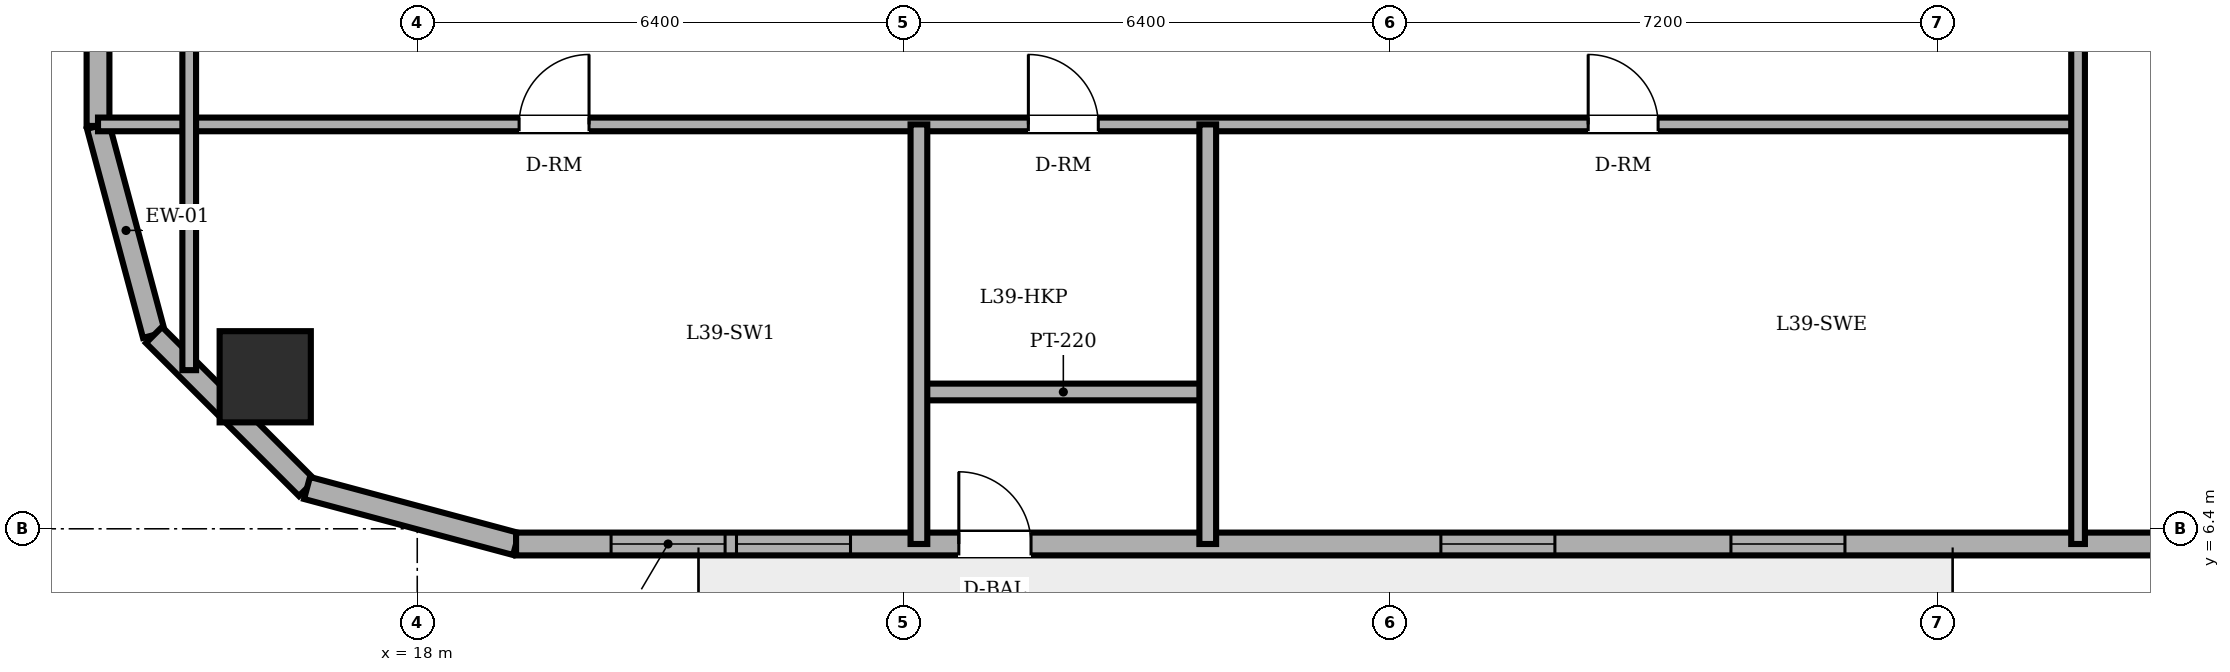
"""IFC4 building model, lengths in metres.
Left out: names, types, materials, properties, quantities, classifications, styles, units other than length and angle.
Written with IfcOpenShell. Run it as: python <this file> out.ifc"""

import sys

from ifc_helpers import new_model, si_unit, direction, frame, frame_2d, origin, origin_2d, place, context, subcontext, project, spatial, rectangle, circle, extrude, element, fill, save


model = new_model("IFC4")
c1 = context("Model", 3, precision=1e-05, world=origin(), true_north=direction((0.0, 1.0)))
c2 = subcontext(c1, "Body", "Model", "MODEL_VIEW")
j1 = project(units=[si_unit("LENGTHUNIT", "METRE"), si_unit("PLANEANGLEUNIT", "RADIAN")], contexts=[c1])
p1 = place(None, origin())
s1 = spatial("IfcSite", under=j1, at=p1, CompositionType="ELEMENT")
p2 = place(p1, origin())
s2 = spatial("IfcBuilding", under=s1, at=p2, CompositionType="ELEMENT")
p3 = place(p2, frame((0.0, 0.0, 151.0)))
s3 = spatial("IfcBuildingStorey", under=s2, at=p3, CompositionType="ELEMENT", Elevation=151.0)
p4 = place(p3, frame((16.0, 8.4, 0.0), z_axis=(0.0, 0.0, 1.0), x_axis=(1.0, 0.0, 0.0)))
e1 = element("IfcColumn", 1, at=p4, inside=s3, PredefinedType="COLUMN", context=c2, shape_type="SweptSolid", body=[
    extrude(circle(Radius=0.6, at=origin_2d()), origin(), (0.0, 0.0, 1.0), 3.6),
])
p5 = place(p3, frame((13.8, 11.7, 0.0), z_axis=(0.0, 0.0, 1.0), x_axis=(0.258884674387, -0.965908238586, 0.0)))
e2 = element("IfcWall", 2, at=p5, inside=s3, PredefinedType="SOLIDWALL", context=c2, shape_type="SweptSolid", body=[
    extrude(rectangle(XDim=2.847, YDim=0.3, at=frame_2d((1.424, 0.0))), origin(), (0.0, 0.0, 1.0), 3.4),
])
p6 = place(p3, frame((14.537, 8.95, 0.0), z_axis=(0.0, 0.0, 1.0), x_axis=(0.707106781187, -0.707106781187, 0.0)))
e3 = element("IfcWall", 3, at=p6, inside=s3, PredefinedType="SOLIDWALL", context=c2, shape_type="SweptSolid", body=[
    extrude(rectangle(XDim=2.847, YDim=0.3, at=frame_2d((1.423, 0.0))), origin(), (0.0, 0.0, 1.0), 3.4),
])
p7 = place(p3, frame((16.55, 6.937, 0.0), z_axis=(0.0, 0.0, 1.0), x_axis=(0.965908238586, -0.258884674387, 0.0)))
e4 = element("IfcWall", 4, at=p7, inside=s3, PredefinedType="SOLIDWALL", context=c2, shape_type="SweptSolid", body=[
    extrude(rectangle(XDim=2.847, YDim=0.3, at=frame_2d((1.424, 0.0))), origin(), (0.0, 0.0, 1.0), 3.4),
])
p8 = place(p3, frame((19.3, 6.2, 0.0), z_axis=(0.0, 0.0, 1.0), x_axis=(1.0, 0.0, 0.0)))
e5 = element("IfcWall", 5, at=p8, inside=s3, PredefinedType="SOLIDWALL", context=c2, shape_type="SweptSolid", body=[
    extrude(rectangle(XDim=30.282, YDim=0.3, at=frame_2d((15.141, 0.0))), origin(), (0.0, 0.0, 1.0), 3.4),
])
p9 = place(p8, frame((5.825, 0.0, 0.0)))
e6 = element("IfcOpeningElement", 6, at=p9, cuts=e5, PredefinedType="OPENING", context=c2, shape_type="SweptSolid", body=[
    extrude(rectangle(XDim=0.95, YDim=2.2, at=frame_2d((0.475, 1.1))), frame((0.0, 0.16, 0.0), z_axis=(0.0, -1.0, 0.0), x_axis=(1.0, 0.0, 0.0)), (0.0, 0.0, 1.0), 0.32),
])
p10 = place(p8, frame((1.25, 0.0, 0.85)))
e7 = element("IfcOpeningElement", 7, at=p10, cuts=e5, PredefinedType="OPENING", context=c2, shape_type="SweptSolid", body=[
    extrude(rectangle(XDim=1.5, YDim=1.55, at=frame_2d((0.75, 0.775))), frame((0.0, 0.16, 0.0), z_axis=(0.0, -1.0, 0.0), x_axis=(1.0, 0.0, 0.0)), (0.0, 0.0, 1.0), 0.32),
])
p11 = place(p8, frame((2.9, 0.0, 0.85)))
e8 = element("IfcOpeningElement", 8, at=p11, cuts=e5, PredefinedType="OPENING", context=c2, shape_type="SweptSolid", body=[
    extrude(rectangle(XDim=1.5, YDim=1.55, at=frame_2d((0.75, 0.775))), frame((0.0, 0.16, 0.0), z_axis=(0.0, -1.0, 0.0), x_axis=(1.0, 0.0, 0.0)), (0.0, 0.0, 1.0), 0.32),
])
p12 = place(p8, frame((12.167, 0.0, 0.85)))
e9 = element("IfcOpeningElement", 9, at=p12, cuts=e5, PredefinedType="OPENING", context=c2, shape_type="SweptSolid", body=[
    extrude(rectangle(XDim=1.5, YDim=1.55, at=frame_2d((0.75, 0.775))), frame((0.0, 0.16, 0.0), z_axis=(0.0, -1.0, 0.0), x_axis=(1.0, 0.0, 0.0)), (0.0, 0.0, 1.0), 0.32),
])
p13 = place(p8, frame((15.983, 0.0, 0.85)))
e10 = element("IfcOpeningElement", 10, at=p13, cuts=e5, PredefinedType="OPENING", context=c2, shape_type="SweptSolid", body=[
    extrude(rectangle(XDim=1.5, YDim=1.55, at=frame_2d((0.75, 0.775))), frame((0.0, 0.16, 0.0), z_axis=(0.0, -1.0, 0.0), x_axis=(1.0, 0.0, 0.0)), (0.0, 0.0, 1.0), 0.32),
])
p14 = place(p8, frame((22.484, 0.0, 0.85)))
e11 = element("IfcOpeningElement", 11, at=p14, cuts=e5, PredefinedType="OPENING", context=c2, shape_type="SweptSolid", body=[
    extrude(rectangle(XDim=1.5, YDim=1.55, at=frame_2d((0.75, 0.775))), frame((0.0, 0.16, 0.0), z_axis=(0.0, -1.0, 0.0), x_axis=(1.0, 0.0, 0.0)), (0.0, 0.0, 1.0), 0.32),
])
p15 = place(p8, frame((25.168, 0.0, 0.85)))
e12 = element("IfcOpeningElement", 12, at=p15, cuts=e5, PredefinedType="OPENING", context=c2, shape_type="SweptSolid", body=[
    extrude(rectangle(XDim=1.5, YDim=1.55, at=frame_2d((0.75, 0.775))), frame((0.0, 0.16, 0.0), z_axis=(0.0, -1.0, 0.0), x_axis=(1.0, 0.0, 0.0)), (0.0, 0.0, 1.0), 0.32),
])
p16 = place(p8, frame((28.773, 0.0, 0.85)))
e13 = element("IfcOpeningElement", 13, at=p16, cuts=e5, PredefinedType="OPENING", context=c2, shape_type="SweptSolid", body=[
    extrude(rectangle(XDim=1.05, YDim=1.55, at=frame_2d((0.525, 0.775))), frame((0.0, 0.16, 0.0), z_axis=(0.0, -1.0, 0.0), x_axis=(1.0, 0.0, 0.0)), (0.0, 0.0, 1.0), 0.32),
])
p17 = place(p3, frame((13.8, 36.3, 0.0), z_axis=(0.0, 0.0, 1.0), x_axis=(0.0, -1.0, 0.0)))
e14 = element("IfcWall", 14, at=p17, inside=s3, PredefinedType="SOLIDWALL", context=c2, shape_type="SweptSolid", body=[
    extrude(rectangle(XDim=24.6, YDim=0.3, at=frame_2d((12.3, 0.0))), origin(), (0.0, 0.0, 1.0), 3.4),
])
p18 = place(p17, frame((5.003, 0.0, 0.85)))
e15 = element("IfcOpeningElement", 15, at=p18, cuts=e14, PredefinedType="OPENING", context=c2, shape_type="SweptSolid", body=[
    extrude(rectangle(XDim=1.5, YDim=1.55, at=frame_2d((0.75, 0.775))), frame((0.0, 0.16, 0.0), z_axis=(0.0, -1.0, 0.0), x_axis=(1.0, 0.0, 0.0)), (0.0, 0.0, 1.0), 0.32),
])
p19 = place(p17, frame((8.277, 0.0, 0.85)))
e16 = element("IfcOpeningElement", 16, at=p19, cuts=e14, PredefinedType="OPENING", context=c2, shape_type="SweptSolid", body=[
    extrude(rectangle(XDim=1.5, YDim=1.55, at=frame_2d((0.75, 0.775))), frame((0.0, 0.16, 0.0), z_axis=(0.0, -1.0, 0.0), x_axis=(1.0, 0.0, 0.0)), (0.0, 0.0, 1.0), 0.32),
])
p20 = place(p17, frame((14.823, 0.0, 0.85)))
e17 = element("IfcOpeningElement", 17, at=p20, cuts=e14, PredefinedType="OPENING", context=c2, shape_type="SweptSolid", body=[
    extrude(rectangle(XDim=1.5, YDim=1.55, at=frame_2d((0.75, 0.775))), frame((0.0, 0.16, 0.0), z_axis=(0.0, -1.0, 0.0), x_axis=(1.0, 0.0, 0.0)), (0.0, 0.0, 1.0), 0.32),
])
p21 = place(p17, frame((18.097, 0.0, 0.85)))
e18 = element("IfcOpeningElement", 18, at=p21, cuts=e14, PredefinedType="OPENING", context=c2, shape_type="SweptSolid", body=[
    extrude(rectangle(XDim=1.5, YDim=1.55, at=frame_2d((0.75, 0.775))), frame((0.0, 0.16, 0.0), z_axis=(0.0, -1.0, 0.0), x_axis=(1.0, 0.0, 0.0)), (0.0, 0.0, 1.0), 0.32),
])
p22 = place(p3, frame((24.6, 8.2, 0.0), z_axis=(0.0, 0.0, 1.0), x_axis=(1.0, 0.0, 0.0)))
e19 = element("IfcWall", 19, at=p22, inside=s3, PredefinedType="PARTITIONING", context=c2, shape_type="SweptSolid", body=[
    extrude(rectangle(XDim=3.8, YDim=0.22, at=frame_2d((1.9, 0.0))), origin(), (0.0, 0.0, 1.0), 2.882),
])
p23 = place(p3, frame((13.8, 11.72, 0.0), z_axis=(0.0, 0.0, 1.0), x_axis=(1.0, 0.0, 0.0)))
e20 = element("IfcWall", 20, at=p23, inside=s3, PredefinedType="PARTITIONING", context=c2, shape_type="SweptSolid", body=[
    extrude(rectangle(XDim=26.05, YDim=0.18, at=frame_2d((13.025, 0.0))), origin(), (0.0, 0.0, 1.0), 3.4),
])
p24 = place(p23, frame((12.24, 0.0, 0.0)))
e21 = element("IfcOpeningElement", 21, at=p24, cuts=e20, PredefinedType="OPENING", context=c2, shape_type="SweptSolid", body=[
    extrude(rectangle(XDim=0.92, YDim=2.1, at=frame_2d((0.46, 1.05))), frame((0.0, 0.1, 0.0), z_axis=(0.0, -1.0, 0.0), x_axis=(1.0, 0.0, 0.0)), (0.0, 0.0, 1.0), 0.2),
])
p25 = place(p23, frame((5.54, 0.0, 0.0)))
e22 = element("IfcOpeningElement", 22, at=p25, cuts=e20, PredefinedType="OPENING", context=c2, shape_type="SweptSolid", body=[
    extrude(rectangle(XDim=0.92, YDim=2.1, at=frame_2d((0.46, 1.05))), frame((0.0, 0.1, 0.0), z_axis=(0.0, -1.0, 0.0), x_axis=(1.0, 0.0, 0.0)), (0.0, 0.0, 1.0), 0.2),
])
p26 = place(p23, frame((19.605, 0.0, 0.0)))
e23 = element("IfcOpeningElement", 23, at=p26, cuts=e20, PredefinedType="OPENING", context=c2, shape_type="SweptSolid", body=[
    extrude(rectangle(XDim=0.92, YDim=2.1, at=frame_2d((0.46, 1.05))), frame((0.0, 0.1, 0.0), z_axis=(0.0, -1.0, 0.0), x_axis=(1.0, 0.0, 0.0)), (0.0, 0.0, 1.0), 0.2),
])
p27 = place(p3, frame((15.0, 8.487, 0.0), z_axis=(0.0, 0.0, 1.0), x_axis=(0.0, 1.0, 0.0)))
e24 = element("IfcWall", 24, at=p27, inside=s3, PredefinedType="PARTITIONING", context=c2, shape_type="SweptSolid", body=[
    extrude(rectangle(XDim=5.693, YDim=0.18, at=frame_2d((2.846, 0.0))), origin(), (0.0, 0.0, 1.0), 3.4),
])
for number, where, z_axis, x_axis in (
    (25, (24.6, 6.2, 0.0), (0.0, 0.0, 1.0), (0.0, 1.0, 0.0)),
    (26, (28.4, 6.2, 0.0), (0.0, 0.0, 1.0), (0.0, 1.0, 0.0)),
):
    element("IfcWall", number, at=place(p3, frame(where, z_axis=z_axis, x_axis=x_axis)), inside=s3, PredefinedType="PARTITIONING", context=c2, shape_type="SweptSolid", body=[
        extrude(rectangle(XDim=5.52, YDim=0.22, at=frame_2d((2.76, 0.0))), origin(), (0.0, 0.0, 1.0), 3.4),
    ])
p28 = place(p3, frame((39.85, 6.2, 0.0), z_axis=(0.0, 0.0, 1.0), x_axis=(0.0, 1.0, 0.0)))
e27 = element("IfcWall", 27, at=p28, inside=s3, PredefinedType="PARTITIONING", context=c2, shape_type="SweptSolid", body=[
    extrude(rectangle(XDim=16.62, YDim=0.18, at=frame_2d((8.31, 0.0))), origin(), (0.0, 0.0, 1.0), 3.4),
])
p29 = place(p28, frame((10.31, 0.0, 0.0)))
e28 = element("IfcOpeningElement", 28, at=p29, cuts=e27, PredefinedType="OPENING", context=c2, shape_type="SweptSolid", body=[
    extrude(rectangle(XDim=1.0, YDim=2.15, at=frame_2d((0.5, 1.075))), frame((0.0, 0.1, 0.0), z_axis=(0.0, -1.0, 0.0), x_axis=(1.0, 0.0, 0.0)), (0.0, 0.0, 1.0), 0.2),
])
p30 = place(p9, origin())
e29 = element("IfcDoor", 29, at=p30, inside=s3, OperationType="SINGLE_SWING_LEFT", PredefinedType="DOOR", context=c2, shape_type="SweptSolid", body=[
    extrude(rectangle(XDim=0.95, YDim=2.2, at=frame_2d((0.475, 1.1))), frame((0.0, 0.025, 0.0), z_axis=(0.0, -1.0, 0.0), x_axis=(1.0, 0.0, 0.0)), (0.0, 0.0, 1.0), 0.05),
])
fill(e6, e29)
p31 = place(p10, origin())
e30 = element("IfcWindow", 30, at=p31, inside=s3, PartitioningType="DOUBLE_PANEL_VERTICAL", PredefinedType="WINDOW", context=c2, shape_type="SweptSolid", body=[
    extrude(rectangle(XDim=1.5, YDim=1.55, at=frame_2d((0.75, 0.775))), frame((0.0, 0.03, 0.0), z_axis=(0.0, -1.0, 0.0), x_axis=(1.0, 0.0, 0.0)), (0.0, 0.0, 1.0), 0.06),
])
fill(e7, e30)
p32 = place(p11, origin())
e31 = element("IfcWindow", 31, at=p32, inside=s3, PartitioningType="DOUBLE_PANEL_VERTICAL", PredefinedType="WINDOW", context=c2, shape_type="SweptSolid", body=[
    extrude(rectangle(XDim=1.5, YDim=1.55, at=frame_2d((0.75, 0.775))), frame((0.0, 0.03, 0.0), z_axis=(0.0, -1.0, 0.0), x_axis=(1.0, 0.0, 0.0)), (0.0, 0.0, 1.0), 0.06),
])
fill(e8, e31)
p33 = place(p12, origin())
e32 = element("IfcWindow", 32, at=p33, inside=s3, PartitioningType="DOUBLE_PANEL_VERTICAL", PredefinedType="WINDOW", context=c2, shape_type="SweptSolid", body=[
    extrude(rectangle(XDim=1.5, YDim=1.55, at=frame_2d((0.75, 0.775))), frame((0.0, 0.03, 0.0), z_axis=(0.0, -1.0, 0.0), x_axis=(1.0, 0.0, 0.0)), (0.0, 0.0, 1.0), 0.06),
])
fill(e9, e32)
p34 = place(p13, origin())
e33 = element("IfcWindow", 33, at=p34, inside=s3, PartitioningType="DOUBLE_PANEL_VERTICAL", PredefinedType="WINDOW", context=c2, shape_type="SweptSolid", body=[
    extrude(rectangle(XDim=1.5, YDim=1.55, at=frame_2d((0.75, 0.775))), frame((0.0, 0.03, 0.0), z_axis=(0.0, -1.0, 0.0), x_axis=(1.0, 0.0, 0.0)), (0.0, 0.0, 1.0), 0.06),
])
fill(e10, e33)
p35 = place(p24, origin())
e34 = element("IfcDoor", 34, at=p35, inside=s3, OperationType="SINGLE_SWING_LEFT", PredefinedType="DOOR", context=c2, shape_type="SweptSolid", body=[
    extrude(rectangle(XDim=0.92, YDim=2.1, at=frame_2d((0.46, 1.05))), frame((0.0, 0.025, 0.0), z_axis=(0.0, -1.0, 0.0), x_axis=(1.0, 0.0, 0.0)), (0.0, 0.0, 1.0), 0.05),
])
fill(e21, e34)
p36 = place(p25, origin())
e35 = element("IfcDoor", 35, at=p36, inside=s3, OperationType="SINGLE_SWING_RIGHT", PredefinedType="DOOR", context=c2, shape_type="SweptSolid", body=[
    extrude(rectangle(XDim=0.92, YDim=2.1, at=frame_2d((0.46, 1.05))), frame((0.0, 0.025, 0.0), z_axis=(0.0, -1.0, 0.0), x_axis=(1.0, 0.0, 0.0)), (0.0, 0.0, 1.0), 0.05),
])
fill(e22, e35)
p37 = place(p26, origin())
e36 = element("IfcDoor", 36, at=p37, inside=s3, OperationType="SINGLE_SWING_LEFT", PredefinedType="DOOR", context=c2, shape_type="SweptSolid", body=[
    extrude(rectangle(XDim=0.92, YDim=2.1, at=frame_2d((0.46, 1.05))), frame((0.0, 0.025, 0.0), z_axis=(0.0, -1.0, 0.0), x_axis=(1.0, 0.0, 0.0)), (0.0, 0.0, 1.0), 0.05),
])
fill(e23, e36)
save(model, sys.argv[1])
